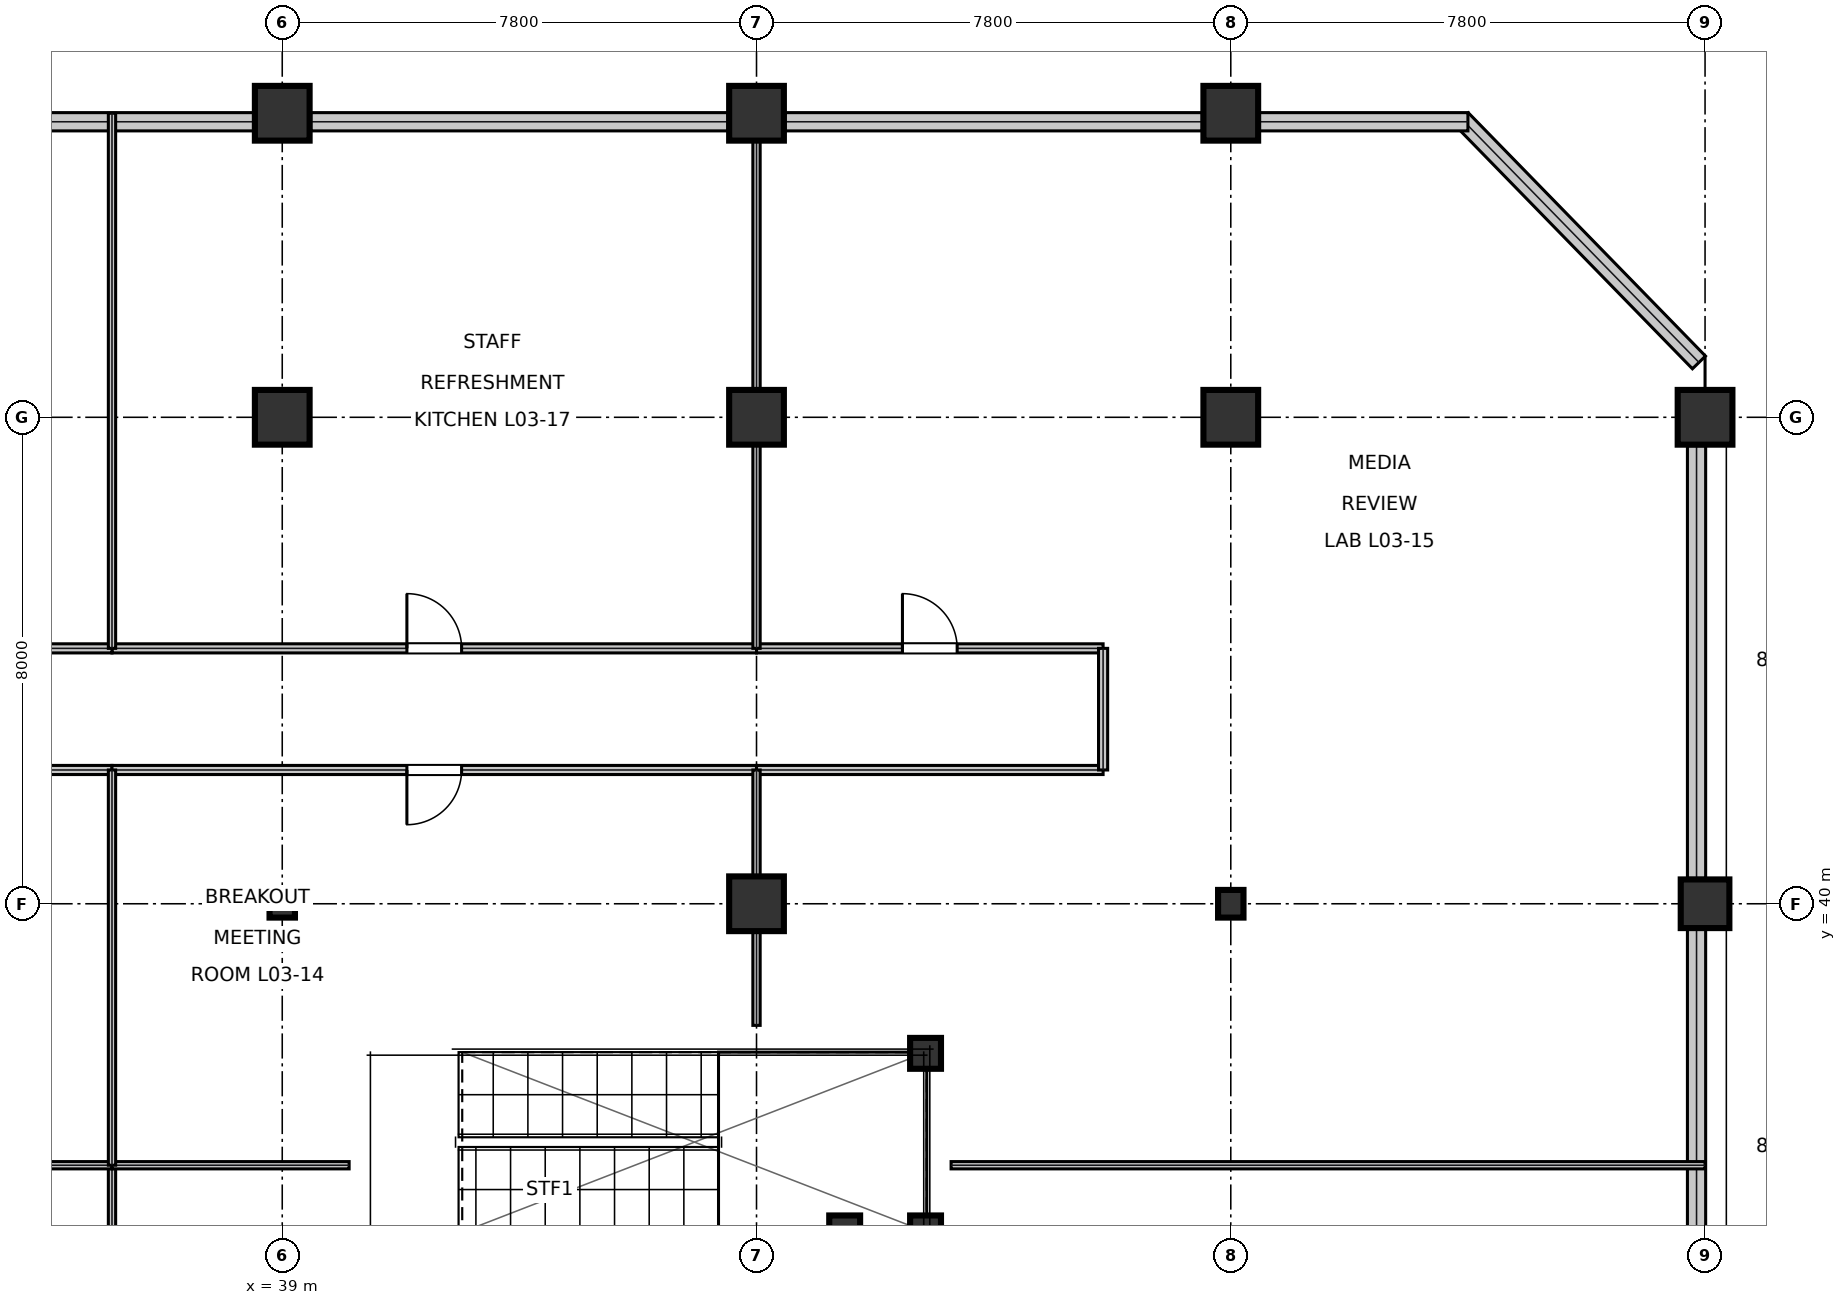
"""IFC4 building model, lengths in metres.
Left out: names, types, materials, properties, quantities, classifications, styles, units other than length and angle.
Written with IfcOpenShell. Run it as: python <this file> out.ifc"""

import sys

from ifc_helpers import new_model, si_unit, direction, frame, frame_2d, origin, origin_2d, place, context, subcontext, project, spatial, rectangle, hollow_circle, i_section, extrude, element, fill, save


model = new_model("IFC4")
c1 = context("Model", 3, precision=1e-05, world=origin(), true_north=direction((0.0, 1.0)))
c2 = subcontext(c1, "Body", "Model", "MODEL_VIEW")
j1 = project(units=[si_unit("LENGTHUNIT", "METRE"), si_unit("PLANEANGLEUNIT", "RADIAN")], contexts=[c1])
p1 = place(None, origin())
s1 = spatial("IfcSite", under=j1, at=p1, CompositionType="ELEMENT")
p2 = place(p1, origin())
s2 = spatial("IfcBuilding", under=s1, at=p2, CompositionType="ELEMENT")
p3 = place(p2, frame((0.0, 0.0, 16.2)))
s3 = spatial("IfcBuildingStorey", under=s2, at=p3, CompositionType="ELEMENT", Elevation=16.2)
p4 = place(p3, frame((39.0, 40.0, 0.0), z_axis=(0.0, 0.0, 1.0), x_axis=(1.0, 0.0, 0.0)))
e1 = element("IfcColumn", 1, at=p4, inside=s3, PredefinedType="COLUMN", context=c2, shape_type="SweptSolid", body=[
    extrude(i_section(OverallWidth=0.418, OverallDepth=0.455, WebThickness=0.042, FlangeThickness=0.068, at=origin_2d()), origin(), (0.0, 0.0, 1.0), 5.395),
])
for number, where, z_axis, x_axis in (
    (2, (39.0, 48.0, 0.0), (0.0, 0.0, 1.0), (1.0, 0.0, 0.0)),
    (3, (39.0, 53.0, 0.0), (0.0, 0.0, 1.0), (1.0, 0.0, 0.0)),
    (4, (46.8, 40.0, 0.0), (0.0, 0.0, 1.0), (1.0, 0.0, 0.0)),
    (5, (46.8, 48.0, 0.0), (0.0, 0.0, 1.0), (1.0, 0.0, 0.0)),
    (6, (46.8, 53.0, 0.0), (0.0, 0.0, 1.0), (1.0, 0.0, 0.0)),
):
    element("IfcColumn", number, at=place(p3, frame(where, z_axis=z_axis, x_axis=x_axis)), inside=s3, PredefinedType="COLUMN", context=c2, shape_type="SweptSolid", body=[
        extrude(rectangle(XDim=0.9, YDim=0.9, at=origin_2d()), origin(), (0.0, 0.0, 1.0), 5.395),
    ])
p5 = place(p3, frame((54.6, 40.0, 0.0), z_axis=(0.0, 0.0, 1.0), x_axis=(1.0, 0.0, 0.0)))
e7 = element("IfcColumn", 7, at=p5, inside=s3, PredefinedType="COLUMN", context=c2, shape_type="SweptSolid", body=[
    extrude(i_section(OverallWidth=0.418, OverallDepth=0.455, WebThickness=0.042, FlangeThickness=0.068, at=origin_2d()), origin(), (0.0, 0.0, 1.0), 5.395),
])
for number, where, z_axis, x_axis in (
    (8, (54.6, 48.0, 0.0), (0.0, 0.0, 1.0), (1.0, 0.0, 0.0)),
    (9, (54.6, 53.0, 0.0), (0.0, 0.0, 1.0), (1.0, 0.0, 0.0)),
):
    element("IfcColumn", number, at=place(p3, frame(where, z_axis=z_axis, x_axis=x_axis)), inside=s3, PredefinedType="COLUMN", context=c2, shape_type="SweptSolid", body=[
        extrude(rectangle(XDim=0.9, YDim=0.9, at=origin_2d()), origin(), (0.0, 0.0, 1.0), 5.395),
    ])
p6 = place(p3, frame((62.4, 40.0, 0.0), z_axis=(0.0, 0.0, 1.0), x_axis=(1.0, 0.0, 0.0)))
e10 = element("IfcColumn", 10, at=p6, inside=s3, PredefinedType="COLUMN", context=c2, shape_type="SweptSolid", body=[
    extrude(rectangle(XDim=0.8, YDim=0.8, at=origin_2d()), origin(), (0.0, 0.0, 1.0), 5.395),
])
p7 = place(p3, frame((62.4, 48.0, 0.0), z_axis=(0.0, 0.0, 1.0), x_axis=(1.0, 0.0, 0.0)))
e11 = element("IfcColumn", 11, at=p7, inside=s3, PredefinedType="COLUMN", context=c2, shape_type="SweptSolid", body=[
    extrude(rectangle(XDim=0.9, YDim=0.9, at=origin_2d()), origin(), (0.0, 0.0, 1.0), 5.395),
])
for number, where, z_axis, x_axis in (
    (12, (48.25, 34.62, 0.0), (0.0, 0.0, 1.0), (1.0, 0.0, 0.0)),
    (13, (49.58, 34.62, 0.0), (0.0, 0.0, 1.0), (1.0, 0.0, 0.0)),
    (14, (49.58, 37.54, 0.0), (0.0, 0.0, 1.0), (1.0, 0.0, 0.0)),
):
    element("IfcColumn", number, at=place(p3, frame(where, z_axis=z_axis, x_axis=x_axis)), inside=s3, PredefinedType="COLUMN", context=c2, shape_type="SweptSolid", body=[
        extrude(hollow_circle(Radius=0.254, WallThickness=0.02, at=origin_2d()), origin(), (0.0, 0.0, 1.0), 5.394),
    ])
for number, where, z_axis, x_axis in (
    (15, (62.26, 32.468, 0.0), (0.0, 0.0, 1.0), (0.0, 1.0, 0.0)),
    (16, (62.26, 40.418, 0.0), (0.0, 0.0, 1.0), (0.0, 1.0, 0.0)),
):
    element("IfcWall", number, at=place(p3, frame(where, z_axis=z_axis, x_axis=x_axis)), inside=s3, PredefinedType="STANDARD", context=c2, shape_type="SweptSolid", body=[
        extrude(rectangle(XDim=7.114, YDim=0.3, at=frame_2d((3.557, 0.0))), origin(), (0.0, 0.0, 1.0), 4.648),
    ])
p8 = place(p3, frame((62.3, 48.902, 0.0), z_axis=(0.0, 0.0, 1.0), x_axis=(-0.698091174493, 0.716008877106, 0.0)))
e17 = element("IfcWall", 17, at=p8, inside=s3, PredefinedType="STANDARD", context=c2, shape_type="SweptSolid", body=[
    extrude(rectangle(XDim=5.586, YDim=0.3, at=frame_2d((2.793, 0.0))), origin(), (0.0, 0.0, 1.0), 5.12),
])
p9 = place(p3, frame((58.5, 52.86, 0.0), z_axis=(0.0, 0.0, 1.0), x_axis=(-1.0, 0.0, 0.0)))
e18 = element("IfcWall", 18, at=p9, inside=s3, PredefinedType="STANDARD", context=c2, shape_type="SweptSolid", body=[
    extrude(rectangle(XDim=3.432, YDim=0.3, at=frame_2d((1.716, 0.0))), origin(), (0.0, 0.0, 1.0), 5.12),
])
for number, where, z_axis, x_axis in (
    (19, (54.132, 52.86, 0.0), (0.0, 0.0, 1.0), (-1.0, 0.0, 0.0)),
    (20, (46.332, 52.86, 0.0), (0.0, 0.0, 1.0), (-1.0, 0.0, 0.0)),
    (21, (38.532, 52.86, 0.0), (0.0, 0.0, 1.0), (-1.0, 0.0, 0.0)),
):
    element("IfcWall", number, at=place(p3, frame(where, z_axis=z_axis, x_axis=x_axis)), inside=s3, PredefinedType="STANDARD", context=c2, shape_type="SweptSolid", body=[
        extrude(rectangle(XDim=6.864, YDim=0.3, at=frame_2d((3.432, 0.0))), origin(), (0.0, 0.0, 1.0), 4.648),
    ])
p10 = place(p3, frame((28.2, 42.2, 0.0), z_axis=(0.0, 0.0, 1.0), x_axis=(1.0, 0.0, 0.0)))
e22 = element("IfcWall", 22, at=p10, inside=s3, PredefinedType="PARTITIONING", context=c2, shape_type="SweptSolid", body=[
    extrude(rectangle(XDim=8.0, YDim=0.15, at=frame_2d((4.0, 0.0))), origin(), (0.0, 0.0, 1.0), 4.415),
])
p11 = place(p10, frame((3.55, 0.0, 0.0)))
e23 = element("IfcOpeningElement", 23, at=p11, cuts=e22, PredefinedType="OPENING", context=c2, shape_type="SweptSolid", body=[
    extrude(rectangle(XDim=0.9, YDim=2.15, at=frame_2d((0.45, 1.075))), frame((0.0, 0.085, 0.0), z_axis=(0.0, -1.0, 0.0), x_axis=(1.0, 0.0, 0.0)), (0.0, 0.0, 1.0), 0.17),
])
p12 = place(p3, frame((36.2, 42.2, 0.0), z_axis=(0.0, 0.0, 1.0), x_axis=(1.0, 0.0, 0.0)))
e24 = element("IfcWall", 24, at=p12, inside=s3, PredefinedType="PARTITIONING", context=c2, shape_type="SweptSolid", body=[
    extrude(rectangle(XDim=10.6, YDim=0.15, at=frame_2d((5.3, 0.0))), origin(), (0.0, 0.0, 1.0), 4.415),
])
p13 = place(p12, frame((4.85, 0.0, 0.0)))
e25 = element("IfcOpeningElement", 25, at=p13, cuts=e24, PredefinedType="OPENING", context=c2, shape_type="SweptSolid", body=[
    extrude(rectangle(XDim=0.9, YDim=2.15, at=frame_2d((0.45, 1.075))), frame((0.0, 0.085, 0.0), z_axis=(0.0, -1.0, 0.0), x_axis=(1.0, 0.0, 0.0)), (0.0, 0.0, 1.0), 0.17),
])
p14 = place(p3, frame((46.8, 44.2, 0.0), z_axis=(0.0, 0.0, 1.0), x_axis=(1.0, 0.0, 0.0)))
e26 = element("IfcWall", 26, at=p14, inside=s3, PredefinedType="PARTITIONING", context=c2, shape_type="SweptSolid", body=[
    extrude(rectangle(XDim=5.7, YDim=0.15, at=frame_2d((2.85, 0.0))), origin(), (0.0, 0.0, 1.0), 4.415),
])
p15 = place(p14, frame((2.4, 0.0, 0.0)))
e27 = element("IfcOpeningElement", 27, at=p15, cuts=e26, PredefinedType="OPENING", context=c2, shape_type="SweptSolid", body=[
    extrude(rectangle(XDim=0.9, YDim=2.15, at=frame_2d((0.45, 1.075))), frame((0.0, 0.085, 0.0), z_axis=(0.0, -1.0, 0.0), x_axis=(1.0, 0.0, 0.0)), (0.0, 0.0, 1.0), 0.17),
])
p16 = place(p3, frame((36.2, 44.2, 0.0), z_axis=(0.0, 0.0, 1.0), x_axis=(1.0, 0.0, 0.0)))
e28 = element("IfcWall", 28, at=p16, inside=s3, PredefinedType="PARTITIONING", context=c2, shape_type="SweptSolid", body=[
    extrude(rectangle(XDim=10.6, YDim=0.15, at=frame_2d((5.3, 0.0))), origin(), (0.0, 0.0, 1.0), 4.415),
])
p17 = place(p16, frame((4.85, 0.0, 0.0)))
e29 = element("IfcOpeningElement", 29, at=p17, cuts=e28, PredefinedType="OPENING", context=c2, shape_type="SweptSolid", body=[
    extrude(rectangle(XDim=0.9, YDim=2.15, at=frame_2d((0.45, 1.075))), frame((0.0, 0.085, 0.0), z_axis=(0.0, -1.0, 0.0), x_axis=(1.0, 0.0, 0.0)), (0.0, 0.0, 1.0), 0.17),
])
p18 = place(p3, frame((46.8, 42.2, 0.0), z_axis=(0.0, 0.0, 1.0), x_axis=(1.0, 0.0, 0.0)))
e30 = element("IfcWall", 30, at=p18, inside=s3, PredefinedType="PARTITIONING", context=c2, shape_type="SweptSolid", body=[
    extrude(rectangle(XDim=5.7, YDim=0.15, at=frame_2d((2.85, 0.0))), origin(), (0.0, 0.0, 1.0), 4.415),
])
p19 = place(p3, frame((52.5, 42.2, 0.0), z_axis=(0.0, 0.0, 1.0), x_axis=(0.0, 1.0, 0.0)))
e31 = element("IfcWall", 31, at=p19, inside=s3, PredefinedType="PARTITIONING", context=c2, shape_type="SweptSolid", body=[
    extrude(rectangle(XDim=2.0, YDim=0.15, at=frame_2d((1.0, 0.0))), origin(), (0.0, 0.0, 1.0), 4.701),
])
p20 = place(p3, frame((28.2, 44.2, 0.0), z_axis=(0.0, 0.0, 1.0), x_axis=(1.0, 0.0, 0.0)))
e32 = element("IfcWall", 32, at=p20, inside=s3, PredefinedType="PARTITIONING", context=c2, shape_type="SweptSolid", body=[
    extrude(rectangle(XDim=8.0, YDim=0.15, at=frame_2d((4.0, 0.0))), origin(), (0.0, 0.0, 1.0), 4.415),
])
p21 = place(p3, frame((50.0, 35.7, 0.0), z_axis=(0.0, 0.0, 1.0), x_axis=(1.0, 0.0, 0.0)))
e33 = element("IfcWall", 33, at=p21, inside=s3, PredefinedType="PARTITIONING", context=c2, shape_type="SweptSolid", body=[
    extrude(rectangle(XDim=12.4, YDim=0.12, at=frame_2d((6.2, 0.0))), origin(), (0.0, 0.0, 1.0), 4.415),
])
p22 = place(p3, frame((36.2, 28.2, 0.0), z_axis=(0.0, 0.0, 1.0), x_axis=(0.0, 1.0, 0.0)))
e34 = element("IfcWall", 34, at=p22, inside=s3, PredefinedType="PARTITIONING", context=c2, shape_type="SweptSolid", body=[
    extrude(rectangle(XDim=7.5, YDim=0.12, at=frame_2d((3.75, 0.0))), origin(), (0.0, 0.0, 1.0), 4.338),
])
p23 = place(p3, frame((28.2, 35.7, 0.0), z_axis=(0.0, 0.0, 1.0), x_axis=(1.0, 0.0, 0.0)))
e35 = element("IfcWall", 35, at=p23, inside=s3, PredefinedType="PARTITIONING", context=c2, shape_type="SweptSolid", body=[
    extrude(rectangle(XDim=8.0, YDim=0.12, at=frame_2d((4.0, 0.0))), origin(), (0.0, 0.0, 1.0), 4.415),
])
p24 = place(p3, frame((36.2, 35.7, 0.0), z_axis=(0.0, 0.0, 1.0), x_axis=(1.0, 0.0, 0.0)))
e36 = element("IfcWall", 36, at=p24, inside=s3, PredefinedType="PARTITIONING", context=c2, shape_type="SweptSolid", body=[
    extrude(rectangle(XDim=3.9, YDim=0.12, at=frame_2d((1.95, 0.0))), origin(), (0.0, 0.0, 1.0), 4.415),
])
p25 = place(p3, frame((36.2, 35.7, 0.0), z_axis=(0.0, 0.0, 1.0), x_axis=(0.0, 1.0, 0.0)))
e37 = element("IfcWall", 37, at=p25, inside=s3, PredefinedType="PARTITIONING", context=c2, shape_type="SweptSolid", body=[
    extrude(rectangle(XDim=6.5, YDim=0.12, at=frame_2d((3.25, 0.0))), origin(), (0.0, 0.0, 1.0), 4.338),
])
p26 = place(p3, frame((46.8, 38.0, 0.0), z_axis=(0.0, 0.0, 1.0), x_axis=(0.0, 1.0, 0.0)))
e38 = element("IfcWall", 38, at=p26, inside=s3, PredefinedType="PARTITIONING", context=c2, shape_type="SweptSolid", body=[
    extrude(rectangle(XDim=4.2, YDim=0.12, at=frame_2d((2.1, 0.0))), origin(), (0.0, 0.0, 1.0), 4.338),
])
for number, where, z_axis, x_axis in (
    (39, (46.8, 44.2, 0.0), (0.0, 0.0, 1.0), (0.0, 1.0, 0.0)),
    (40, (36.2, 44.2, 0.0), (0.0, 0.0, 1.0), (0.0, 1.0, 0.0)),
):
    element("IfcWall", number, at=place(p3, frame(where, z_axis=z_axis, x_axis=x_axis)), inside=s3, PredefinedType="PARTITIONING", context=c2, shape_type="SweptSolid", body=[
        extrude(rectangle(XDim=8.8, YDim=0.12, at=frame_2d((4.4, 0.0))), origin(), (0.0, 0.0, 1.0), 4.338),
    ])
p27 = place(p13, frame((0.9, 0.0, 0.0), z_axis=(0.0, 0.0, 1.0), x_axis=(-1.0, 0.0, 0.0)))
e41 = element("IfcDoor", 41, at=p27, inside=s3, OperationType="SINGLE_SWING_RIGHT", PredefinedType="DOOR", context=c2, shape_type="SweptSolid", body=[
    extrude(rectangle(XDim=0.9, YDim=2.15, at=frame_2d((0.45, 1.075))), frame((0.0, 0.025, 0.0), z_axis=(0.0, -1.0, 0.0), x_axis=(1.0, 0.0, 0.0)), (0.0, 0.0, 1.0), 0.05),
])
fill(e25, e41)
p28 = place(p15, origin())
e42 = element("IfcDoor", 42, at=p28, inside=s3, OperationType="SINGLE_SWING_LEFT", PredefinedType="DOOR", context=c2, shape_type="SweptSolid", body=[
    extrude(rectangle(XDim=0.9, YDim=2.15, at=frame_2d((0.45, 1.075))), frame((0.0, 0.025, 0.0), z_axis=(0.0, -1.0, 0.0), x_axis=(1.0, 0.0, 0.0)), (0.0, 0.0, 1.0), 0.05),
])
fill(e27, e42)
p29 = place(p17, origin())
e43 = element("IfcDoor", 43, at=p29, inside=s3, OperationType="SINGLE_SWING_LEFT", PredefinedType="DOOR", context=c2, shape_type="SweptSolid", body=[
    extrude(rectangle(XDim=0.9, YDim=2.15, at=frame_2d((0.45, 1.075))), frame((0.0, 0.025, 0.0), z_axis=(0.0, -1.0, 0.0), x_axis=(1.0, 0.0, 0.0)), (0.0, 0.0, 1.0), 0.05),
])
fill(e29, e43)
save(model, sys.argv[1])
